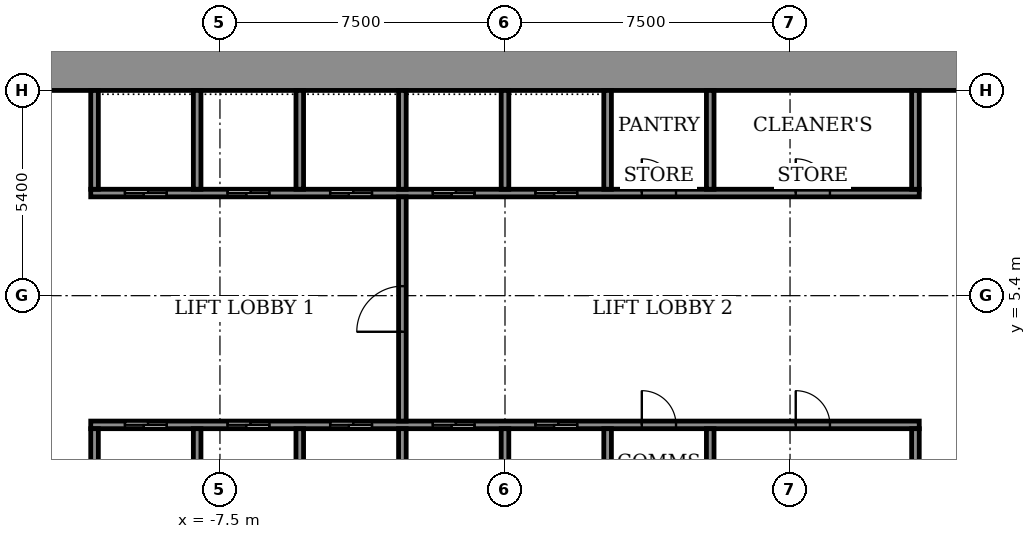
"""IFC4 building model, lengths in metres.
Left out: names, types, materials, properties, quantities, classifications, styles, units other than length and angle.
Written with IfcOpenShell. Run it as: python <this file> out.ifc"""

import sys

from ifc_helpers import new_model, si_unit, direction, frame, frame_2d, origin, place, context, subcontext, project, spatial, rectangle, extrude, element, fill, save


model = new_model("IFC4")
c1 = context("Model", 3, precision=1e-05, world=origin(), true_north=direction((0.0, 1.0)))
c2 = subcontext(c1, "Body", "Model", "MODEL_VIEW")
j1 = project(units=[si_unit("LENGTHUNIT", "METRE"), si_unit("PLANEANGLEUNIT", "RADIAN")], contexts=[c1])
p1 = place(None, origin())
s1 = spatial("IfcSite", under=j1, at=p1, CompositionType="ELEMENT")
p2 = place(p1, origin())
s2 = spatial("IfcBuilding", under=s1, at=p2, CompositionType="ELEMENT")
p3 = place(p2, frame((0.0, 0.0, 52.1)))
s3 = spatial("IfcBuildingStorey", under=s2, at=p3, CompositionType="ELEMENT", Elevation=52.1)
p4 = place(p3, frame((-14.9, 11.35, 0.0), z_axis=(0.0, 0.0, 1.0), x_axis=(1.0, 0.0, 0.0)))
e1 = element("IfcWall", 1, at=p4, inside=s3, PredefinedType="SHEAR", context=c2, shape_type="SweptSolid", body=[
    extrude(rectangle(XDim=29.8, YDim=1.1, at=frame_2d((14.9, 0.0))), origin(), (0.0, 0.0, 1.0), 4.6),
])
p5 = place(p3, frame((-10.9, 2.0, 0.0), z_axis=(0.0, 0.0, 1.0), x_axis=(1.0, 0.0, 0.0)))
e2 = element("IfcWall", 2, at=p5, inside=s3, PredefinedType="SHEAR", context=c2, shape_type="SweptSolid", body=[
    extrude(rectangle(XDim=21.8, YDim=0.2, at=frame_2d((10.9, 0.0))), origin(), (0.0, 0.0, 1.0), 4.05),
])
p6 = place(p5, frame((0.9, 0.0, 0.0)))
e3 = element("IfcOpeningElement", 3, at=p6, cuts=e2, PredefinedType="OPENING", context=c2, shape_type="SweptSolid", body=[
    extrude(rectangle(XDim=1.1, YDim=2.1, at=frame_2d((0.55, 1.05))), frame((0.0, 0.11, 0.0), z_axis=(0.0, -1.0, 0.0), x_axis=(1.0, 0.0, 0.0)), (0.0, 0.0, 1.0), 0.22),
])
p7 = place(p5, frame((3.6, 0.0, 0.0)))
e4 = element("IfcOpeningElement", 4, at=p7, cuts=e2, PredefinedType="OPENING", context=c2, shape_type="SweptSolid", body=[
    extrude(rectangle(XDim=1.1, YDim=2.1, at=frame_2d((0.55, 1.05))), frame((0.0, 0.11, 0.0), z_axis=(0.0, -1.0, 0.0), x_axis=(1.0, 0.0, 0.0)), (0.0, 0.0, 1.0), 0.22),
])
p8 = place(p5, frame((6.3, 0.0, 0.0)))
e5 = element("IfcOpeningElement", 5, at=p8, cuts=e2, PredefinedType="OPENING", context=c2, shape_type="SweptSolid", body=[
    extrude(rectangle(XDim=1.1, YDim=2.1, at=frame_2d((0.55, 1.05))), frame((0.0, 0.11, 0.0), z_axis=(0.0, -1.0, 0.0), x_axis=(1.0, 0.0, 0.0)), (0.0, 0.0, 1.0), 0.22),
])
p9 = place(p5, frame((9.0, 0.0, 0.0)))
e6 = element("IfcOpeningElement", 6, at=p9, cuts=e2, PredefinedType="OPENING", context=c2, shape_type="SweptSolid", body=[
    extrude(rectangle(XDim=1.1, YDim=2.1, at=frame_2d((0.55, 1.05))), frame((0.0, 0.11, 0.0), z_axis=(0.0, -1.0, 0.0), x_axis=(1.0, 0.0, 0.0)), (0.0, 0.0, 1.0), 0.22),
])
p10 = place(p5, frame((11.7, 0.0, 0.0)))
e7 = element("IfcOpeningElement", 7, at=p10, cuts=e2, PredefinedType="OPENING", context=c2, shape_type="SweptSolid", body=[
    extrude(rectangle(XDim=1.1, YDim=2.1, at=frame_2d((0.55, 1.05))), frame((0.0, 0.11, 0.0), z_axis=(0.0, -1.0, 0.0), x_axis=(1.0, 0.0, 0.0)), (0.0, 0.0, 1.0), 0.22),
])
p11 = place(p5, frame((14.5, 0.0, 0.0)))
e8 = element("IfcOpeningElement", 8, at=p11, cuts=e2, PredefinedType="OPENING", context=c2, shape_type="SweptSolid", body=[
    extrude(rectangle(XDim=0.9, YDim=2.1, at=frame_2d((0.45, 1.05))), frame((0.0, 0.11, 0.0), z_axis=(0.0, -1.0, 0.0), x_axis=(1.0, 0.0, 0.0)), (0.0, 0.0, 1.0), 0.22),
])
p12 = place(p5, frame((18.55, 0.0, 0.0)))
e9 = element("IfcOpeningElement", 9, at=p12, cuts=e2, PredefinedType="OPENING", context=c2, shape_type="SweptSolid", body=[
    extrude(rectangle(XDim=0.9, YDim=2.1, at=frame_2d((0.45, 1.05))), frame((0.0, 0.11, 0.0), z_axis=(0.0, -1.0, 0.0), x_axis=(1.0, 0.0, 0.0)), (0.0, 0.0, 1.0), 0.22),
])
p13 = place(p3, frame((-10.9, 8.1, 0.0), z_axis=(0.0, 0.0, 1.0), x_axis=(1.0, 0.0, 0.0)))
e10 = element("IfcWall", 10, at=p13, inside=s3, PredefinedType="SHEAR", context=c2, shape_type="SweptSolid", body=[
    extrude(rectangle(XDim=21.8, YDim=0.2, at=frame_2d((10.9, 0.0))), origin(), (0.0, 0.0, 1.0), 4.05),
])
p14 = place(p13, frame((0.9, 0.0, 0.0)))
e11 = element("IfcOpeningElement", 11, at=p14, cuts=e10, PredefinedType="OPENING", context=c2, shape_type="SweptSolid", body=[
    extrude(rectangle(XDim=1.1, YDim=2.1, at=frame_2d((0.55, 1.05))), frame((0.0, 0.11, 0.0), z_axis=(0.0, -1.0, 0.0), x_axis=(1.0, 0.0, 0.0)), (0.0, 0.0, 1.0), 0.22),
])
p15 = place(p13, frame((3.6, 0.0, 0.0)))
e12 = element("IfcOpeningElement", 12, at=p15, cuts=e10, PredefinedType="OPENING", context=c2, shape_type="SweptSolid", body=[
    extrude(rectangle(XDim=1.1, YDim=2.1, at=frame_2d((0.55, 1.05))), frame((0.0, 0.11, 0.0), z_axis=(0.0, -1.0, 0.0), x_axis=(1.0, 0.0, 0.0)), (0.0, 0.0, 1.0), 0.22),
])
p16 = place(p13, frame((6.3, 0.0, 0.0)))
e13 = element("IfcOpeningElement", 13, at=p16, cuts=e10, PredefinedType="OPENING", context=c2, shape_type="SweptSolid", body=[
    extrude(rectangle(XDim=1.1, YDim=2.1, at=frame_2d((0.55, 1.05))), frame((0.0, 0.11, 0.0), z_axis=(0.0, -1.0, 0.0), x_axis=(1.0, 0.0, 0.0)), (0.0, 0.0, 1.0), 0.22),
])
p17 = place(p13, frame((9.0, 0.0, 0.0)))
e14 = element("IfcOpeningElement", 14, at=p17, cuts=e10, PredefinedType="OPENING", context=c2, shape_type="SweptSolid", body=[
    extrude(rectangle(XDim=1.1, YDim=2.1, at=frame_2d((0.55, 1.05))), frame((0.0, 0.11, 0.0), z_axis=(0.0, -1.0, 0.0), x_axis=(1.0, 0.0, 0.0)), (0.0, 0.0, 1.0), 0.22),
])
p18 = place(p13, frame((11.7, 0.0, 0.0)))
e15 = element("IfcOpeningElement", 15, at=p18, cuts=e10, PredefinedType="OPENING", context=c2, shape_type="SweptSolid", body=[
    extrude(rectangle(XDim=1.1, YDim=2.1, at=frame_2d((0.55, 1.05))), frame((0.0, 0.11, 0.0), z_axis=(0.0, -1.0, 0.0), x_axis=(1.0, 0.0, 0.0)), (0.0, 0.0, 1.0), 0.22),
])
p19 = place(p13, frame((14.5, 0.0, 0.0)))
e16 = element("IfcOpeningElement", 16, at=p19, cuts=e10, PredefinedType="OPENING", context=c2, shape_type="SweptSolid", body=[
    extrude(rectangle(XDim=0.9, YDim=2.1, at=frame_2d((0.45, 1.05))), frame((0.0, 0.11, 0.0), z_axis=(0.0, -1.0, 0.0), x_axis=(1.0, 0.0, 0.0)), (0.0, 0.0, 1.0), 0.22),
])
p20 = place(p13, frame((18.55, 0.0, 0.0)))
e17 = element("IfcOpeningElement", 17, at=p20, cuts=e10, PredefinedType="OPENING", context=c2, shape_type="SweptSolid", body=[
    extrude(rectangle(XDim=0.9, YDim=2.1, at=frame_2d((0.45, 1.05))), frame((0.0, 0.11, 0.0), z_axis=(0.0, -1.0, 0.0), x_axis=(1.0, 0.0, 0.0)), (0.0, 0.0, 1.0), 0.22),
])
for number, where, z_axis, x_axis in (
    (18, (-10.8, -0.6, 0.0), (0.0, 0.0, 1.0), (0.0, 1.0, 0.0)),
    (19, (-8.1, -0.6, 0.0), (0.0, 0.0, 1.0), (0.0, 1.0, 0.0)),
    (20, (-5.4, -0.6, 0.0), (0.0, 0.0, 1.0), (0.0, 1.0, 0.0)),
    (21, (-2.7, -0.6, 0.0), (0.0, 0.0, 1.0), (0.0, 1.0, 0.0)),
    (22, (0.0, -0.6, 0.0), (0.0, 0.0, 1.0), (0.0, 1.0, 0.0)),
    (23, (2.7, -0.6, 0.0), (0.0, 0.0, 1.0), (0.0, 1.0, 0.0)),
):
    element("IfcWall", number, at=place(p3, frame(where, z_axis=z_axis, x_axis=x_axis)), inside=s3, PredefinedType="SHEAR", context=c2, shape_type="SweptSolid", body=[
        extrude(rectangle(XDim=2.5, YDim=0.2, at=frame_2d((1.25, 0.0))), origin(), (0.0, 0.0, 1.0), 4.05),
    ])
for number, where, z_axis, x_axis in (
    (24, (5.4, -0.6, 0.0), (0.0, 0.0, 1.0), (0.0, 1.0, 0.0)),
    (25, (10.8, -0.6, 0.0), (0.0, 0.0, 1.0), (0.0, 1.0, 0.0)),
):
    element("IfcWall", number, at=place(p3, frame(where, z_axis=z_axis, x_axis=x_axis)), inside=s3, PredefinedType="STANDARD", context=c2, shape_type="SweptSolid", body=[
        extrude(rectangle(XDim=2.5, YDim=0.2, at=frame_2d((1.25, 0.0))), origin(), (0.0, 0.0, 1.0), 4.05),
    ])
for number, where, z_axis, x_axis in (
    (26, (-10.8, 8.2, 0.0), (0.0, 0.0, 1.0), (0.0, 1.0, 0.0)),
    (27, (-8.1, 8.2, 0.0), (0.0, 0.0, 1.0), (0.0, 1.0, 0.0)),
    (28, (-5.4, 8.2, 0.0), (0.0, 0.0, 1.0), (0.0, 1.0, 0.0)),
    (29, (-2.7, 8.2, 0.0), (0.0, 0.0, 1.0), (0.0, 1.0, 0.0)),
    (30, (0.0, 8.2, 0.0), (0.0, 0.0, 1.0), (0.0, 1.0, 0.0)),
    (31, (2.7, 8.2, 0.0), (0.0, 0.0, 1.0), (0.0, 1.0, 0.0)),
):
    element("IfcWall", number, at=place(p3, frame(where, z_axis=z_axis, x_axis=x_axis)), inside=s3, PredefinedType="SHEAR", context=c2, shape_type="SweptSolid", body=[
        extrude(rectangle(XDim=2.6, YDim=0.2, at=frame_2d((1.3, 0.0))), origin(), (0.0, 0.0, 1.0), 4.05),
    ])
for number, where, z_axis, x_axis in (
    (32, (5.4, 8.2, 0.0), (0.0, 0.0, 1.0), (0.0, 1.0, 0.0)),
    (33, (10.8, 8.2, 0.0), (0.0, 0.0, 1.0), (0.0, 1.0, 0.0)),
):
    element("IfcWall", number, at=place(p3, frame(where, z_axis=z_axis, x_axis=x_axis)), inside=s3, PredefinedType="STANDARD", context=c2, shape_type="SweptSolid", body=[
        extrude(rectangle(XDim=2.6, YDim=0.2, at=frame_2d((1.3, 0.0))), origin(), (0.0, 0.0, 1.0), 4.05),
    ])
p21 = place(p3, frame((-2.7, 2.1, 0.0), z_axis=(0.0, 0.0, 1.0), x_axis=(0.0, 1.0, 0.0)))
e34 = element("IfcWall", 34, at=p21, inside=s3, PredefinedType="STANDARD", context=c2, shape_type="SweptSolid", body=[
    extrude(rectangle(XDim=5.9, YDim=0.2, at=frame_2d((2.95, 0.0))), origin(), (0.0, 0.0, 1.0), 4.05),
])
p22 = place(p21, frame((2.35, 0.0, 0.0)))
e35 = element("IfcOpeningElement", 35, at=p22, cuts=e34, PredefinedType="OPENING", context=c2, shape_type="SweptSolid", body=[
    extrude(rectangle(XDim=1.2, YDim=2.1, at=frame_2d((0.6, 1.05))), frame((0.0, 0.11, 0.0), z_axis=(0.0, -1.0, 0.0), x_axis=(1.0, 0.0, 0.0)), (0.0, 0.0, 1.0), 0.22),
])
p23 = place(p6, origin())
e36 = element("IfcDoor", 36, at=p23, inside=s3, OperationType="SLIDING_TO_LEFT", PredefinedType="DOOR", context=c2, shape_type="SweptSolid", body=[
    extrude(rectangle(XDim=1.1, YDim=2.1, at=frame_2d((0.55, 1.05))), frame((0.0, 0.025, 0.0), z_axis=(0.0, -1.0, 0.0), x_axis=(1.0, 0.0, 0.0)), (0.0, 0.0, 1.0), 0.05),
])
fill(e3, e36)
p24 = place(p7, origin())
e37 = element("IfcDoor", 37, at=p24, inside=s3, OperationType="SLIDING_TO_LEFT", PredefinedType="DOOR", context=c2, shape_type="SweptSolid", body=[
    extrude(rectangle(XDim=1.1, YDim=2.1, at=frame_2d((0.55, 1.05))), frame((0.0, 0.025, 0.0), z_axis=(0.0, -1.0, 0.0), x_axis=(1.0, 0.0, 0.0)), (0.0, 0.0, 1.0), 0.05),
])
fill(e4, e37)
p25 = place(p8, origin())
e38 = element("IfcDoor", 38, at=p25, inside=s3, OperationType="SLIDING_TO_LEFT", PredefinedType="DOOR", context=c2, shape_type="SweptSolid", body=[
    extrude(rectangle(XDim=1.1, YDim=2.1, at=frame_2d((0.55, 1.05))), frame((0.0, 0.025, 0.0), z_axis=(0.0, -1.0, 0.0), x_axis=(1.0, 0.0, 0.0)), (0.0, 0.0, 1.0), 0.05),
])
fill(e5, e38)
p26 = place(p9, origin())
e39 = element("IfcDoor", 39, at=p26, inside=s3, OperationType="SLIDING_TO_LEFT", PredefinedType="DOOR", context=c2, shape_type="SweptSolid", body=[
    extrude(rectangle(XDim=1.1, YDim=2.1, at=frame_2d((0.55, 1.05))), frame((0.0, 0.025, 0.0), z_axis=(0.0, -1.0, 0.0), x_axis=(1.0, 0.0, 0.0)), (0.0, 0.0, 1.0), 0.05),
])
fill(e6, e39)
p27 = place(p10, origin())
e40 = element("IfcDoor", 40, at=p27, inside=s3, OperationType="SLIDING_TO_LEFT", PredefinedType="DOOR", context=c2, shape_type="SweptSolid", body=[
    extrude(rectangle(XDim=1.1, YDim=2.1, at=frame_2d((0.55, 1.05))), frame((0.0, 0.025, 0.0), z_axis=(0.0, -1.0, 0.0), x_axis=(1.0, 0.0, 0.0)), (0.0, 0.0, 1.0), 0.05),
])
fill(e7, e40)
p28 = place(p14, origin())
e41 = element("IfcDoor", 41, at=p28, inside=s3, OperationType="SLIDING_TO_LEFT", PredefinedType="DOOR", context=c2, shape_type="SweptSolid", body=[
    extrude(rectangle(XDim=1.1, YDim=2.1, at=frame_2d((0.55, 1.05))), frame((0.0, 0.025, 0.0), z_axis=(0.0, -1.0, 0.0), x_axis=(1.0, 0.0, 0.0)), (0.0, 0.0, 1.0), 0.05),
])
fill(e11, e41)
p29 = place(p15, origin())
e42 = element("IfcDoor", 42, at=p29, inside=s3, OperationType="SLIDING_TO_LEFT", PredefinedType="DOOR", context=c2, shape_type="SweptSolid", body=[
    extrude(rectangle(XDim=1.1, YDim=2.1, at=frame_2d((0.55, 1.05))), frame((0.0, 0.025, 0.0), z_axis=(0.0, -1.0, 0.0), x_axis=(1.0, 0.0, 0.0)), (0.0, 0.0, 1.0), 0.05),
])
fill(e12, e42)
p30 = place(p16, origin())
e43 = element("IfcDoor", 43, at=p30, inside=s3, OperationType="SLIDING_TO_LEFT", PredefinedType="DOOR", context=c2, shape_type="SweptSolid", body=[
    extrude(rectangle(XDim=1.1, YDim=2.1, at=frame_2d((0.55, 1.05))), frame((0.0, 0.025, 0.0), z_axis=(0.0, -1.0, 0.0), x_axis=(1.0, 0.0, 0.0)), (0.0, 0.0, 1.0), 0.05),
])
fill(e13, e43)
p31 = place(p17, origin())
e44 = element("IfcDoor", 44, at=p31, inside=s3, OperationType="SLIDING_TO_LEFT", PredefinedType="DOOR", context=c2, shape_type="SweptSolid", body=[
    extrude(rectangle(XDim=1.1, YDim=2.1, at=frame_2d((0.55, 1.05))), frame((0.0, 0.025, 0.0), z_axis=(0.0, -1.0, 0.0), x_axis=(1.0, 0.0, 0.0)), (0.0, 0.0, 1.0), 0.05),
])
fill(e14, e44)
p32 = place(p18, origin())
e45 = element("IfcDoor", 45, at=p32, inside=s3, OperationType="SLIDING_TO_LEFT", PredefinedType="DOOR", context=c2, shape_type="SweptSolid", body=[
    extrude(rectangle(XDim=1.1, YDim=2.1, at=frame_2d((0.55, 1.05))), frame((0.0, 0.025, 0.0), z_axis=(0.0, -1.0, 0.0), x_axis=(1.0, 0.0, 0.0)), (0.0, 0.0, 1.0), 0.05),
])
fill(e15, e45)
p33 = place(p11, origin())
e46 = element("IfcDoor", 46, at=p33, inside=s3, OperationType="SINGLE_SWING_LEFT", PredefinedType="DOOR", context=c2, shape_type="SweptSolid", body=[
    extrude(rectangle(XDim=0.9, YDim=2.1, at=frame_2d((0.45, 1.05))), frame((0.0, 0.025, 0.0), z_axis=(0.0, -1.0, 0.0), x_axis=(1.0, 0.0, 0.0)), (0.0, 0.0, 1.0), 0.05),
])
fill(e8, e46)
p34 = place(p12, origin())
e47 = element("IfcDoor", 47, at=p34, inside=s3, OperationType="SINGLE_SWING_RIGHT", PredefinedType="DOOR", context=c2, shape_type="SweptSolid", body=[
    extrude(rectangle(XDim=0.9, YDim=2.1, at=frame_2d((0.45, 1.05))), frame((0.0, 0.025, 0.0), z_axis=(0.0, -1.0, 0.0), x_axis=(1.0, 0.0, 0.0)), (0.0, 0.0, 1.0), 0.05),
])
fill(e9, e47)
p35 = place(p19, origin())
e48 = element("IfcDoor", 48, at=p35, inside=s3, OperationType="SINGLE_SWING_RIGHT", PredefinedType="DOOR", context=c2, shape_type="SweptSolid", body=[
    extrude(rectangle(XDim=0.9, YDim=2.1, at=frame_2d((0.45, 1.05))), frame((0.0, 0.025, 0.0), z_axis=(0.0, -1.0, 0.0), x_axis=(1.0, 0.0, 0.0)), (0.0, 0.0, 1.0), 0.05),
])
fill(e16, e48)
p36 = place(p20, origin())
e49 = element("IfcDoor", 49, at=p36, inside=s3, OperationType="SINGLE_SWING_RIGHT", PredefinedType="DOOR", context=c2, shape_type="SweptSolid", body=[
    extrude(rectangle(XDim=0.9, YDim=2.1, at=frame_2d((0.45, 1.05))), frame((0.0, 0.025, 0.0), z_axis=(0.0, -1.0, 0.0), x_axis=(1.0, 0.0, 0.0)), (0.0, 0.0, 1.0), 0.05),
])
fill(e17, e49)
p37 = place(p22, origin())
e50 = element("IfcDoor", 50, at=p37, inside=s3, OperationType="SINGLE_SWING_LEFT", PredefinedType="DOOR", context=c2, shape_type="SweptSolid", body=[
    extrude(rectangle(XDim=1.2, YDim=2.1, at=frame_2d((0.6, 1.05))), frame((0.0, 0.025, 0.0), z_axis=(0.0, -1.0, 0.0), x_axis=(1.0, 0.0, 0.0)), (0.0, 0.0, 1.0), 0.05),
])
fill(e35, e50)
save(model, sys.argv[1])
